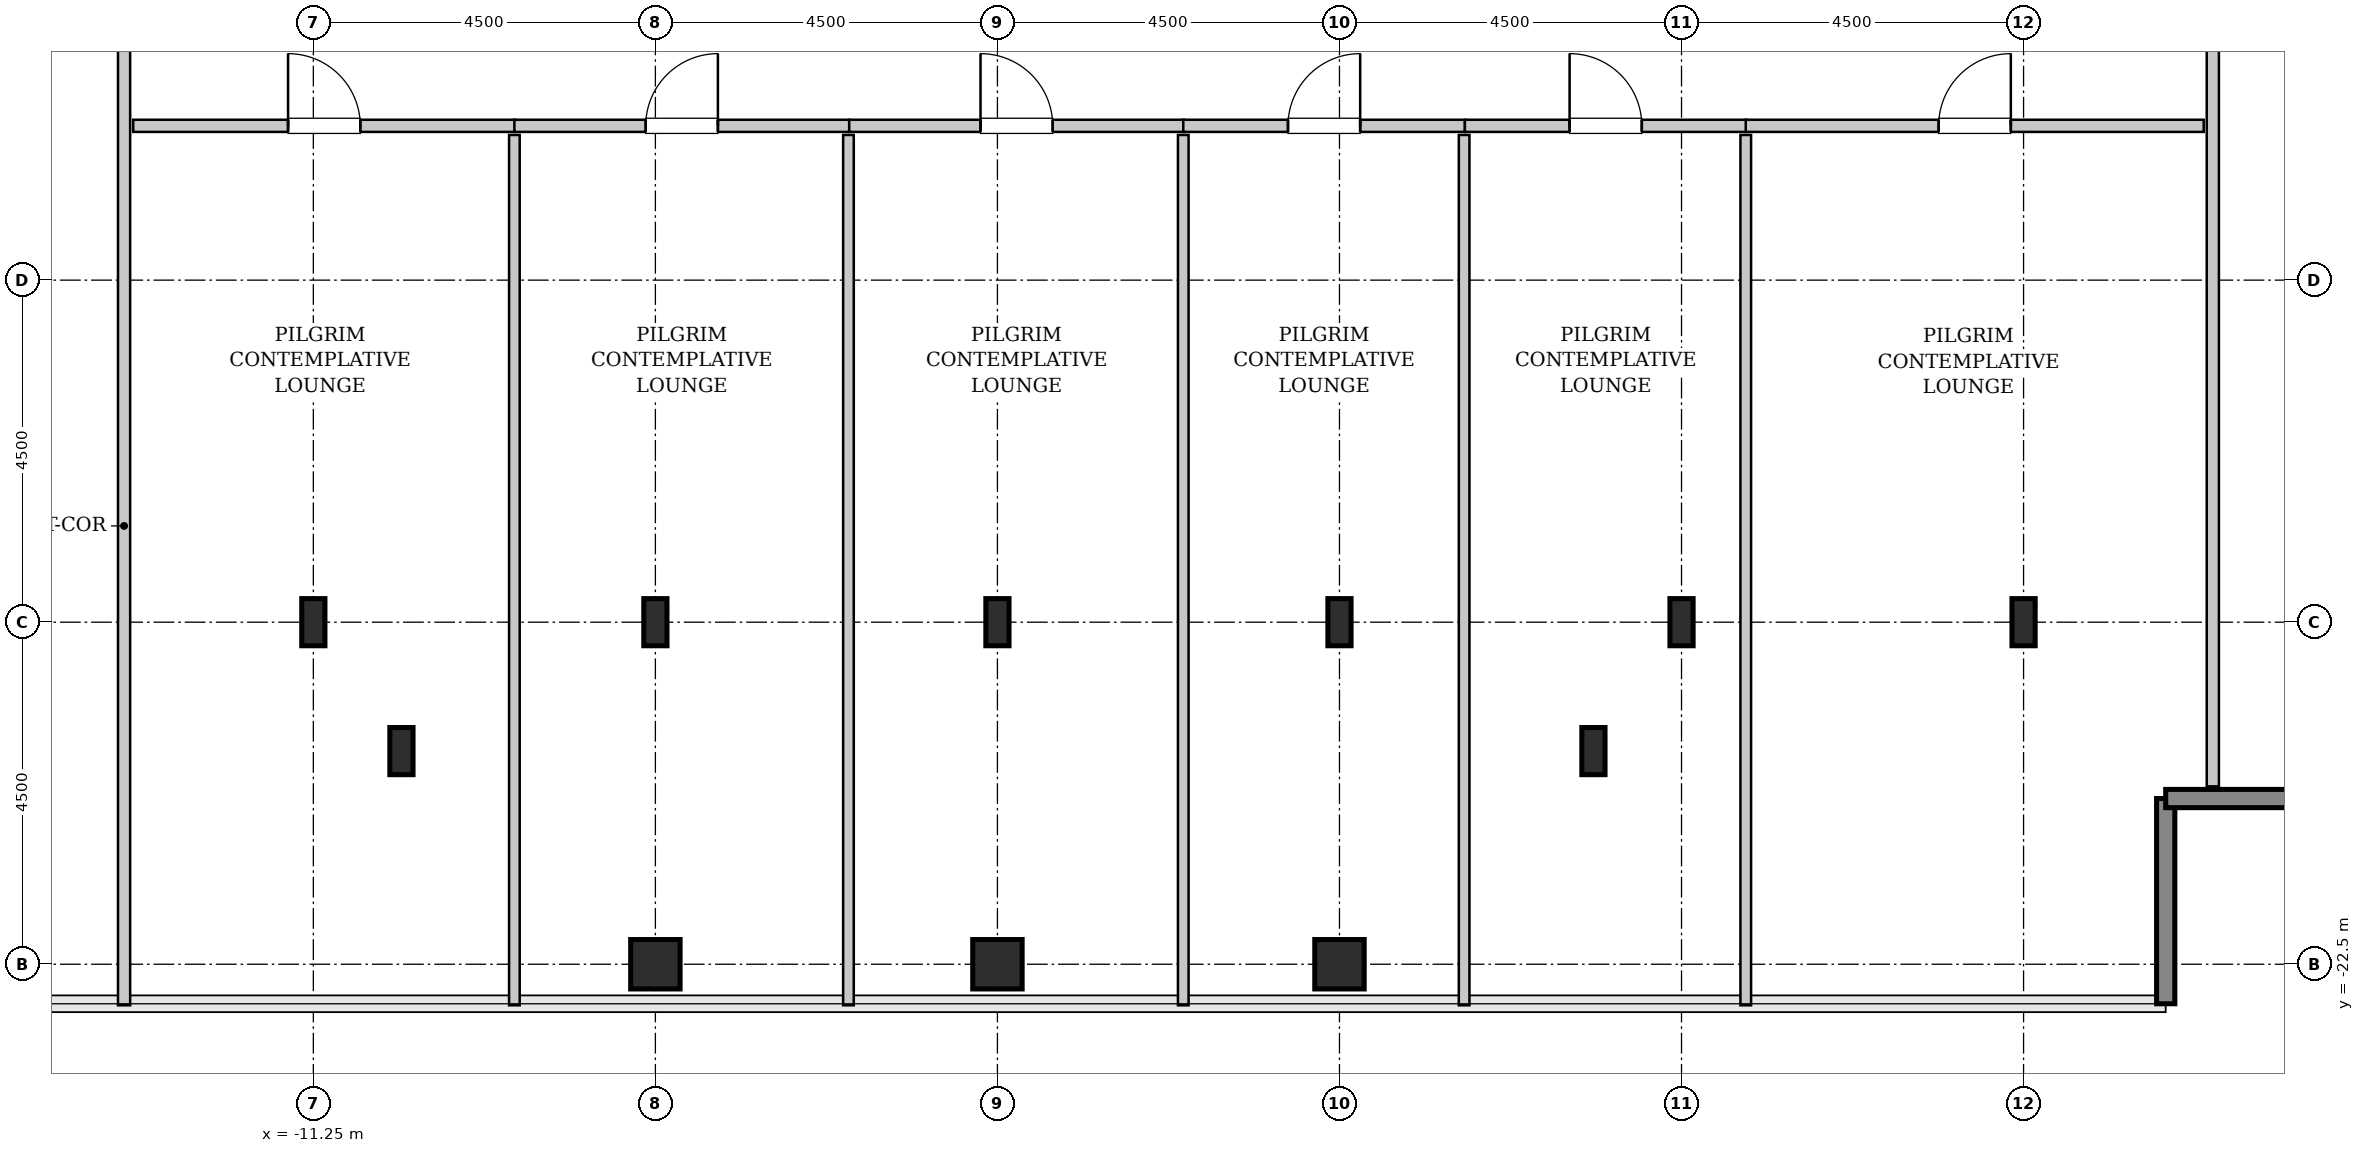
"""IFC4 building model, lengths in metres.
Left out: names, types, materials, properties, quantities, classifications, styles, units other than length and angle.
Written with IfcOpenShell. Run it as: python <this file> out.ifc"""

import sys

from ifc_helpers import new_model, si_unit, direction, frame, frame_2d, origin, origin_2d, place, context, subcontext, project, spatial, rectangle, hollow_rectangle, i_section, extrude, source, transform, mapped, element, fill, save


model = new_model("IFC4")
c1 = context("Model", 3, precision=1e-05, world=origin(), true_north=direction((0.0, 1.0)))
c2 = subcontext(c1, "Body", "Model", "MODEL_VIEW")
j1 = project(units=[si_unit("LENGTHUNIT", "METRE"), si_unit("PLANEANGLEUNIT", "RADIAN")], contexts=[c1])
p1 = place(None, origin())
s1 = spatial("IfcSite", under=j1, at=p1, CompositionType="ELEMENT")
p2 = place(p1, origin())
s2 = spatial("IfcBuilding", under=s1, at=p2, CompositionType="ELEMENT")
p3 = place(p2, frame((0.0, 0.0, 279.8)))
s3 = spatial("IfcBuildingStorey", under=s2, at=p3, CompositionType="ELEMENT", Elevation=279.8)
m1 = source(origin(), c2, "Body", "SweptSolid", [
    extrude(i_section(OverallWidth=0.305, OverallDepth=0.62, WebThickness=0.021, FlangeThickness=0.04, FilletRadius=0.027, at=origin_2d()), origin(), (0.0, 0.0, 1.0), 3.8),
])
for number, where, z_axis, x_axis in (
    (1, (-11.25, -18.0, 0.0), (0.0, 0.0, 1.0), (1.0, 0.0, 0.0)),
    (2, (-10.091, -19.696, 0.0), (0.0, 0.0, 1.0), (1.0, 0.0, 0.0)),
):
    element("IfcColumn", number, at=place(p3, frame(where, z_axis=z_axis, x_axis=x_axis)), inside=s3, PredefinedType="COLUMN", context=c2, shape_type="MappedRepresentation", body=[
        mapped(m1, transform((0.0, 0.0, 0.0), x_axis=(1.0, 0.0, 0.0), y_axis=(0.0, 1.0, 0.0), z_axis=(0.0, 0.0, 1.0), scale=1.0)),
    ])
m2 = source(origin(), c2, "Body", "SweptSolid", [
    extrude(hollow_rectangle(XDim=0.65, YDim=0.65, WallThickness=0.032, InnerFilletRadius=0.032, OuterFilletRadius=0.064, at=origin_2d()), origin(), (0.0, 0.0, 1.0), 3.8),
])
p4 = place(p3, frame((-6.75, -22.5, 0.0), z_axis=(0.0, 0.0, 1.0), x_axis=(1.0, 0.0, 0.0)))
e3 = element("IfcColumn", 3, at=p4, inside=s3, PredefinedType="COLUMN", context=c2, shape_type="MappedRepresentation", body=[
    mapped(m2, transform((0.0, 0.0, 0.0), x_axis=(1.0, 0.0, 0.0), y_axis=(0.0, 1.0, 0.0), z_axis=(0.0, 0.0, 1.0), scale=1.0)),
])
p5 = place(p3, frame((-6.75, -18.0, 0.0), z_axis=(0.0, 0.0, 1.0), x_axis=(1.0, 0.0, 0.0)))
e4 = element("IfcColumn", 4, at=p5, inside=s3, PredefinedType="COLUMN", context=c2, shape_type="MappedRepresentation", body=[
    mapped(m1, transform((0.0, 0.0, 0.0), x_axis=(1.0, 0.0, 0.0), y_axis=(0.0, 1.0, 0.0), z_axis=(0.0, 0.0, 1.0), scale=1.0)),
])
p6 = place(p3, frame((-2.25, -22.5, 0.0), z_axis=(0.0, 0.0, 1.0), x_axis=(1.0, 0.0, 0.0)))
e5 = element("IfcColumn", 5, at=p6, inside=s3, PredefinedType="COLUMN", context=c2, shape_type="MappedRepresentation", body=[
    mapped(m2, transform((0.0, 0.0, 0.0), x_axis=(1.0, 0.0, 0.0), y_axis=(0.0, 1.0, 0.0), z_axis=(0.0, 0.0, 1.0), scale=1.0)),
])
p7 = place(p3, frame((-2.25, -18.0, 0.0), z_axis=(0.0, 0.0, 1.0), x_axis=(1.0, 0.0, 0.0)))
e6 = element("IfcColumn", 6, at=p7, inside=s3, PredefinedType="COLUMN", context=c2, shape_type="MappedRepresentation", body=[
    mapped(m1, transform((0.0, 0.0, 0.0), x_axis=(1.0, 0.0, 0.0), y_axis=(0.0, 1.0, 0.0), z_axis=(0.0, 0.0, 1.0), scale=1.0)),
])
p8 = place(p3, frame((2.25, -22.5, 0.0), z_axis=(0.0, 0.0, 1.0), x_axis=(1.0, 0.0, 0.0)))
e7 = element("IfcColumn", 7, at=p8, inside=s3, PredefinedType="COLUMN", context=c2, shape_type="MappedRepresentation", body=[
    mapped(m2, transform((0.0, 0.0, 0.0), x_axis=(1.0, 0.0, 0.0), y_axis=(0.0, 1.0, 0.0), z_axis=(0.0, 0.0, 1.0), scale=1.0)),
])
for number, where, z_axis, x_axis in (
    (8, (2.25, -18.0, 0.0), (0.0, 0.0, 1.0), (1.0, 0.0, 0.0)),
    (9, (5.591, -19.696, 0.0), (0.0, 0.0, 1.0), (1.0, 0.0, 0.0)),
    (10, (6.75, -18.0, 0.0), (0.0, 0.0, 1.0), (1.0, 0.0, 0.0)),
    (11, (11.25, -18.0, 0.0), (0.0, 0.0, 1.0), (1.0, 0.0, 0.0)),
):
    element("IfcColumn", number, at=place(p3, frame(where, z_axis=z_axis, x_axis=x_axis)), inside=s3, PredefinedType="COLUMN", context=c2, shape_type="MappedRepresentation", body=[
        mapped(m1, transform((0.0, 0.0, 0.0), x_axis=(1.0, 0.0, 0.0), y_axis=(0.0, 1.0, 0.0), z_axis=(0.0, 0.0, 1.0), scale=1.0)),
    ])
m3 = source(origin(), c2, "Body", "SweptSolid", [
    extrude(rectangle(XDim=2.7, YDim=0.24, at=frame_2d((1.35, 0.0))), origin(), (0.0, 0.0, 1.0), 3.55),
])
for number, where, z_axis, x_axis in (
    (12, (13.12, -23.02, 0.0), (0.0, 0.0, 1.0), (0.0, 1.0, 0.0)),
    (13, (13.12, -20.32, 0.0), (0.0, 0.0, 1.0), (1.0, 0.0, 0.0)),
):
    element("IfcWall", number, at=place(p3, frame(where, z_axis=z_axis, x_axis=x_axis)), inside=s3, PredefinedType="SHEAR", context=c2, shape_type="MappedRepresentation", body=[
        mapped(m3, transform((0.0, 0.0, 0.0), x_axis=(1.0, 0.0, 0.0), y_axis=(0.0, 1.0, 0.0), z_axis=(0.0, 0.0, 1.0), scale=1.0)),
    ])
m4 = source(origin(), c2, "Body", "SweptSolid", [
    extrude(rectangle(XDim=14.545, YDim=0.16, at=frame_2d((7.272, 0.0))), origin(), (0.0, 0.0, 1.0), 3.535),
])
p9 = place(p3, frame((-13.74, -23.04, 0.0), z_axis=(0.0, 0.0, 1.0), x_axis=(0.0, 1.0, 0.0)))
e14 = element("IfcWall", 14, at=p9, inside=s3, PredefinedType="PARTITIONING", context=c2, shape_type="MappedRepresentation", body=[
    mapped(m4, transform((0.0, 0.0, 0.0), x_axis=(1.0, 0.0, 0.0), y_axis=(0.0, 1.0, 0.0), z_axis=(0.0, 0.0, 1.0), scale=1.0)),
])
p10 = place(p9, frame((12.562, 0.0, 0.0)))
e15 = element("IfcOpeningElement", 15, at=p10, cuts=e14, PredefinedType="OPENING", context=c2, shape_type="SweptSolid", body=[
    extrude(rectangle(XDim=0.95, YDim=2.1, at=frame_2d((0.475, 1.05))), frame((0.0, 0.09, 0.0), z_axis=(0.0, -1.0, 0.0), x_axis=(1.0, 0.0, 0.0)), (0.0, 0.0, 1.0), 0.18),
])
m5 = source(origin(), c2, "Body", "SweptSolid", [
    extrude(rectangle(XDim=12.965, YDim=0.16, at=frame_2d((6.482, 0.0))), origin(), (0.0, 0.0, 1.0), 3.535),
])
p11 = place(p3, frame((13.74, -20.16, 0.0), z_axis=(0.0, 0.0, 1.0), x_axis=(0.0, 1.0, 0.0)))
e16 = element("IfcWall", 16, at=p11, inside=s3, PredefinedType="PARTITIONING", context=c2, shape_type="MappedRepresentation", body=[
    mapped(m5, transform((0.0, 0.0, 0.0), x_axis=(1.0, 0.0, 0.0), y_axis=(0.0, 1.0, 0.0), z_axis=(0.0, 0.0, 1.0), scale=1.0)),
])
p12 = place(p11, frame((10.333, 0.0, 0.0)))
e17 = element("IfcOpeningElement", 17, at=p12, cuts=e16, PredefinedType="OPENING", context=c2, shape_type="SweptSolid", body=[
    extrude(rectangle(XDim=0.95, YDim=2.1, at=frame_2d((0.475, 1.05))), frame((0.0, 0.09, 0.0), z_axis=(0.0, -1.0, 0.0), x_axis=(1.0, 0.0, 0.0)), (0.0, 0.0, 1.0), 0.18),
])
m6 = source(origin(), c2, "Body", "SweptSolid", [
    extrude(rectangle(XDim=5.025, YDim=0.16, at=frame_2d((2.513, 0.0))), origin(), (0.0, 0.0, 1.0), 3.535),
])
p13 = place(p3, frame((-13.62, -11.47, 0.0), z_axis=(0.0, 0.0, 1.0), x_axis=(1.0, 0.0, 0.0)))
e18 = element("IfcWall", 18, at=p13, inside=s3, PredefinedType="PARTITIONING", context=c2, shape_type="MappedRepresentation", body=[
    mapped(m6, transform((0.0, 0.0, 0.0), x_axis=(1.0, 0.0, 0.0), y_axis=(0.0, 1.0, 0.0), z_axis=(0.0, 0.0, 1.0), scale=1.0)),
])
p14 = place(p13, frame((2.038, 0.0, 0.0)))
e19 = element("IfcOpeningElement", 19, at=p14, cuts=e18, PredefinedType="OPENING", context=c2, shape_type="SweptSolid", body=[
    extrude(rectangle(XDim=0.95, YDim=2.1, at=frame_2d((0.475, 1.05))), frame((0.0, 0.09, 0.0), z_axis=(0.0, -1.0, 0.0), x_axis=(1.0, 0.0, 0.0)), (0.0, 0.0, 1.0), 0.18),
])
m7 = source(origin(), c2, "Body", "SweptSolid", [
    extrude(rectangle(XDim=11.45, YDim=0.14, at=frame_2d((5.725, 0.0))), origin(), (0.0, 0.0, 1.0), 3.535),
])
p15 = place(p3, frame((-8.605, -23.04, 0.0), z_axis=(0.0, 0.0, 1.0), x_axis=(0.0, 1.0, 0.0)))
e20 = element("IfcWall", 20, at=p15, inside=s3, PredefinedType="PARTITIONING", context=c2, shape_type="MappedRepresentation", body=[
    mapped(m7, transform((0.0, 0.0, 0.0), x_axis=(1.0, 0.0, 0.0), y_axis=(0.0, 1.0, 0.0), z_axis=(0.0, 0.0, 1.0), scale=1.0)),
])
m8 = source(origin(), c2, "Body", "SweptSolid", [
    extrude(rectangle(XDim=4.405, YDim=0.16, at=frame_2d((2.203, 0.0))), origin(), (0.0, 0.0, 1.0), 3.535),
])
p16 = place(p3, frame((-8.605, -11.47, 0.0), z_axis=(0.0, 0.0, 1.0), x_axis=(1.0, 0.0, 0.0)))
e21 = element("IfcWall", 21, at=p16, inside=s3, PredefinedType="PARTITIONING", context=c2, shape_type="MappedRepresentation", body=[
    mapped(m8, transform((0.0, 0.0, 0.0), x_axis=(1.0, 0.0, 0.0), y_axis=(0.0, 1.0, 0.0), z_axis=(0.0, 0.0, 1.0), scale=1.0)),
])
p17 = place(p16, frame((1.728, 0.0, 0.0)))
e22 = element("IfcOpeningElement", 22, at=p17, cuts=e21, PredefinedType="OPENING", context=c2, shape_type="SweptSolid", body=[
    extrude(rectangle(XDim=0.95, YDim=2.1, at=frame_2d((0.475, 1.05))), frame((0.0, 0.09, 0.0), z_axis=(0.0, -1.0, 0.0), x_axis=(1.0, 0.0, 0.0)), (0.0, 0.0, 1.0), 0.18),
])
p18 = place(p3, frame((-4.21, -23.04, 0.0), z_axis=(0.0, 0.0, 1.0), x_axis=(0.0, 1.0, 0.0)))
e23 = element("IfcWall", 23, at=p18, inside=s3, PredefinedType="PARTITIONING", context=c2, shape_type="MappedRepresentation", body=[
    mapped(m7, transform((0.0, 0.0, 0.0), x_axis=(1.0, 0.0, 0.0), y_axis=(0.0, 1.0, 0.0), z_axis=(0.0, 0.0, 1.0), scale=1.0)),
])
p19 = place(p3, frame((-4.2, -11.47, 0.0), z_axis=(0.0, 0.0, 1.0), x_axis=(1.0, 0.0, 0.0)))
e24 = element("IfcWall", 24, at=p19, inside=s3, PredefinedType="PARTITIONING", context=c2, shape_type="MappedRepresentation", body=[
    mapped(m8, transform((0.0, 0.0, 0.0), x_axis=(1.0, 0.0, 0.0), y_axis=(0.0, 1.0, 0.0), z_axis=(0.0, 0.0, 1.0), scale=1.0)),
])
p20 = place(p19, frame((1.728, 0.0, 0.0)))
e25 = element("IfcOpeningElement", 25, at=p20, cuts=e24, PredefinedType="OPENING", context=c2, shape_type="SweptSolid", body=[
    extrude(rectangle(XDim=0.95, YDim=2.1, at=frame_2d((0.475, 1.05))), frame((0.0, 0.09, 0.0), z_axis=(0.0, -1.0, 0.0), x_axis=(1.0, 0.0, 0.0)), (0.0, 0.0, 1.0), 0.18),
])
p21 = place(p3, frame((0.195, -23.04, 0.0), z_axis=(0.0, 0.0, 1.0), x_axis=(0.0, 1.0, 0.0)))
e26 = element("IfcWall", 26, at=p21, inside=s3, PredefinedType="PARTITIONING", context=c2, shape_type="MappedRepresentation", body=[
    mapped(m7, transform((0.0, 0.0, 0.0), x_axis=(1.0, 0.0, 0.0), y_axis=(0.0, 1.0, 0.0), z_axis=(0.0, 0.0, 1.0), scale=1.0)),
])
m9 = source(origin(), c2, "Body", "SweptSolid", [
    extrude(rectangle(XDim=3.705, YDim=0.16, at=frame_2d((1.853, 0.0))), origin(), (0.0, 0.0, 1.0), 3.535),
])
p22 = place(p3, frame((0.195, -11.47, 0.0), z_axis=(0.0, 0.0, 1.0), x_axis=(1.0, 0.0, 0.0)))
e27 = element("IfcWall", 27, at=p22, inside=s3, PredefinedType="PARTITIONING", context=c2, shape_type="MappedRepresentation", body=[
    mapped(m9, transform((0.0, 0.0, 0.0), x_axis=(1.0, 0.0, 0.0), y_axis=(0.0, 1.0, 0.0), z_axis=(0.0, 0.0, 1.0), scale=1.0)),
])
p23 = place(p22, frame((1.377, 0.0, 0.0)))
e28 = element("IfcOpeningElement", 28, at=p23, cuts=e27, PredefinedType="OPENING", context=c2, shape_type="SweptSolid", body=[
    extrude(rectangle(XDim=0.95, YDim=2.1, at=frame_2d((0.475, 1.05))), frame((0.0, 0.09, 0.0), z_axis=(0.0, -1.0, 0.0), x_axis=(1.0, 0.0, 0.0)), (0.0, 0.0, 1.0), 0.18),
])
p24 = place(p3, frame((3.89, -23.04, 0.0), z_axis=(0.0, 0.0, 1.0), x_axis=(0.0, 1.0, 0.0)))
e29 = element("IfcWall", 29, at=p24, inside=s3, PredefinedType="PARTITIONING", context=c2, shape_type="MappedRepresentation", body=[
    mapped(m7, transform((0.0, 0.0, 0.0), x_axis=(1.0, 0.0, 0.0), y_axis=(0.0, 1.0, 0.0), z_axis=(0.0, 0.0, 1.0), scale=1.0)),
])
m10 = source(origin(), c2, "Body", "SweptSolid", [
    extrude(rectangle(XDim=3.705, YDim=0.16, at=frame_2d((1.853, 0.0))), origin(), (0.0, 0.0, 1.0), 3.535),
])
p25 = place(p3, frame((3.9, -11.47, 0.0), z_axis=(0.0, 0.0, 1.0), x_axis=(1.0, 0.0, 0.0)))
e30 = element("IfcWall", 30, at=p25, inside=s3, PredefinedType="PARTITIONING", context=c2, shape_type="MappedRepresentation", body=[
    mapped(m10, transform((0.0, 0.0, 0.0), x_axis=(1.0, 0.0, 0.0), y_axis=(0.0, 1.0, 0.0), z_axis=(0.0, 0.0, 1.0), scale=1.0)),
])
p26 = place(p25, frame((1.377, 0.0, 0.0)))
e31 = element("IfcOpeningElement", 31, at=p26, cuts=e30, PredefinedType="OPENING", context=c2, shape_type="SweptSolid", body=[
    extrude(rectangle(XDim=0.95, YDim=2.1, at=frame_2d((0.475, 1.05))), frame((0.0, 0.09, 0.0), z_axis=(0.0, -1.0, 0.0), x_axis=(1.0, 0.0, 0.0)), (0.0, 0.0, 1.0), 0.18),
])
p27 = place(p3, frame((7.595, -23.04, 0.0), z_axis=(0.0, 0.0, 1.0), x_axis=(0.0, 1.0, 0.0)))
e32 = element("IfcWall", 32, at=p27, inside=s3, PredefinedType="PARTITIONING", context=c2, shape_type="MappedRepresentation", body=[
    mapped(m7, transform((0.0, 0.0, 0.0), x_axis=(1.0, 0.0, 0.0), y_axis=(0.0, 1.0, 0.0), z_axis=(0.0, 0.0, 1.0), scale=1.0)),
])
m11 = source(origin(), c2, "Body", "SweptSolid", [
    extrude(rectangle(XDim=6.025, YDim=0.16, at=frame_2d((3.013, 0.0))), origin(), (0.0, 0.0, 1.0), 3.535),
])
p28 = place(p3, frame((7.595, -11.47, 0.0), z_axis=(0.0, 0.0, 1.0), x_axis=(1.0, 0.0, 0.0)))
e33 = element("IfcWall", 33, at=p28, inside=s3, PredefinedType="PARTITIONING", context=c2, shape_type="MappedRepresentation", body=[
    mapped(m11, transform((0.0, 0.0, 0.0), x_axis=(1.0, 0.0, 0.0), y_axis=(0.0, 1.0, 0.0), z_axis=(0.0, 0.0, 1.0), scale=1.0)),
])
p29 = place(p28, frame((2.538, 0.0, 0.0)))
e34 = element("IfcOpeningElement", 34, at=p29, cuts=e33, PredefinedType="OPENING", context=c2, shape_type="SweptSolid", body=[
    extrude(rectangle(XDim=0.95, YDim=2.1, at=frame_2d((0.475, 1.05))), frame((0.0, 0.09, 0.0), z_axis=(0.0, -1.0, 0.0), x_axis=(1.0, 0.0, 0.0)), (0.0, 0.0, 1.0), 0.18),
])
m12 = source(origin(), c2, "Body", "SweptSolid", [
    extrude(rectangle(XDim=0.95, YDim=2.1, at=frame_2d((0.475, 1.05))), frame((0.0, 0.025, 0.0), z_axis=(0.0, -1.0, 0.0), x_axis=(1.0, 0.0, 0.0)), (0.0, 0.0, 1.0), 0.05),
])
p30 = place(p14, origin())
e35 = element("IfcDoor", 35, at=p30, inside=s3, OperationType="SINGLE_SWING_LEFT", PredefinedType="DOOR", context=c2, shape_type="MappedRepresentation", body=[
    mapped(m12, transform((0.0, 0.0, 0.0), x_axis=(1.0, 0.0, 0.0), y_axis=(0.0, 1.0, 0.0), z_axis=(0.0, 0.0, 1.0), scale=1.0)),
])
fill(e19, e35)
p31 = place(p17, origin())
e36 = element("IfcDoor", 36, at=p31, inside=s3, OperationType="SINGLE_SWING_RIGHT", PredefinedType="DOOR", context=c2, shape_type="MappedRepresentation", body=[
    mapped(m12, transform((0.0, 0.0, 0.0), x_axis=(1.0, 0.0, 0.0), y_axis=(0.0, 1.0, 0.0), z_axis=(0.0, 0.0, 1.0), scale=1.0)),
])
fill(e22, e36)
p32 = place(p20, origin())
e37 = element("IfcDoor", 37, at=p32, inside=s3, OperationType="SINGLE_SWING_LEFT", PredefinedType="DOOR", context=c2, shape_type="MappedRepresentation", body=[
    mapped(m12, transform((0.0, 0.0, 0.0), x_axis=(1.0, 0.0, 0.0), y_axis=(0.0, 1.0, 0.0), z_axis=(0.0, 0.0, 1.0), scale=1.0)),
])
fill(e25, e37)
p33 = place(p23, origin())
e38 = element("IfcDoor", 38, at=p33, inside=s3, OperationType="SINGLE_SWING_RIGHT", PredefinedType="DOOR", context=c2, shape_type="MappedRepresentation", body=[
    mapped(m12, transform((0.0, 0.0, 0.0), x_axis=(1.0, 0.0, 0.0), y_axis=(0.0, 1.0, 0.0), z_axis=(0.0, 0.0, 1.0), scale=1.0)),
])
fill(e28, e38)
p34 = place(p26, origin())
e39 = element("IfcDoor", 39, at=p34, inside=s3, OperationType="SINGLE_SWING_LEFT", PredefinedType="DOOR", context=c2, shape_type="MappedRepresentation", body=[
    mapped(m12, transform((0.0, 0.0, 0.0), x_axis=(1.0, 0.0, 0.0), y_axis=(0.0, 1.0, 0.0), z_axis=(0.0, 0.0, 1.0), scale=1.0)),
])
fill(e31, e39)
p35 = place(p29, origin())
e40 = element("IfcDoor", 40, at=p35, inside=s3, OperationType="SINGLE_SWING_RIGHT", PredefinedType="DOOR", context=c2, shape_type="MappedRepresentation", body=[
    mapped(m12, transform((0.0, 0.0, 0.0), x_axis=(1.0, 0.0, 0.0), y_axis=(0.0, 1.0, 0.0), z_axis=(0.0, 0.0, 1.0), scale=1.0)),
])
fill(e34, e40)
save(model, sys.argv[1])
